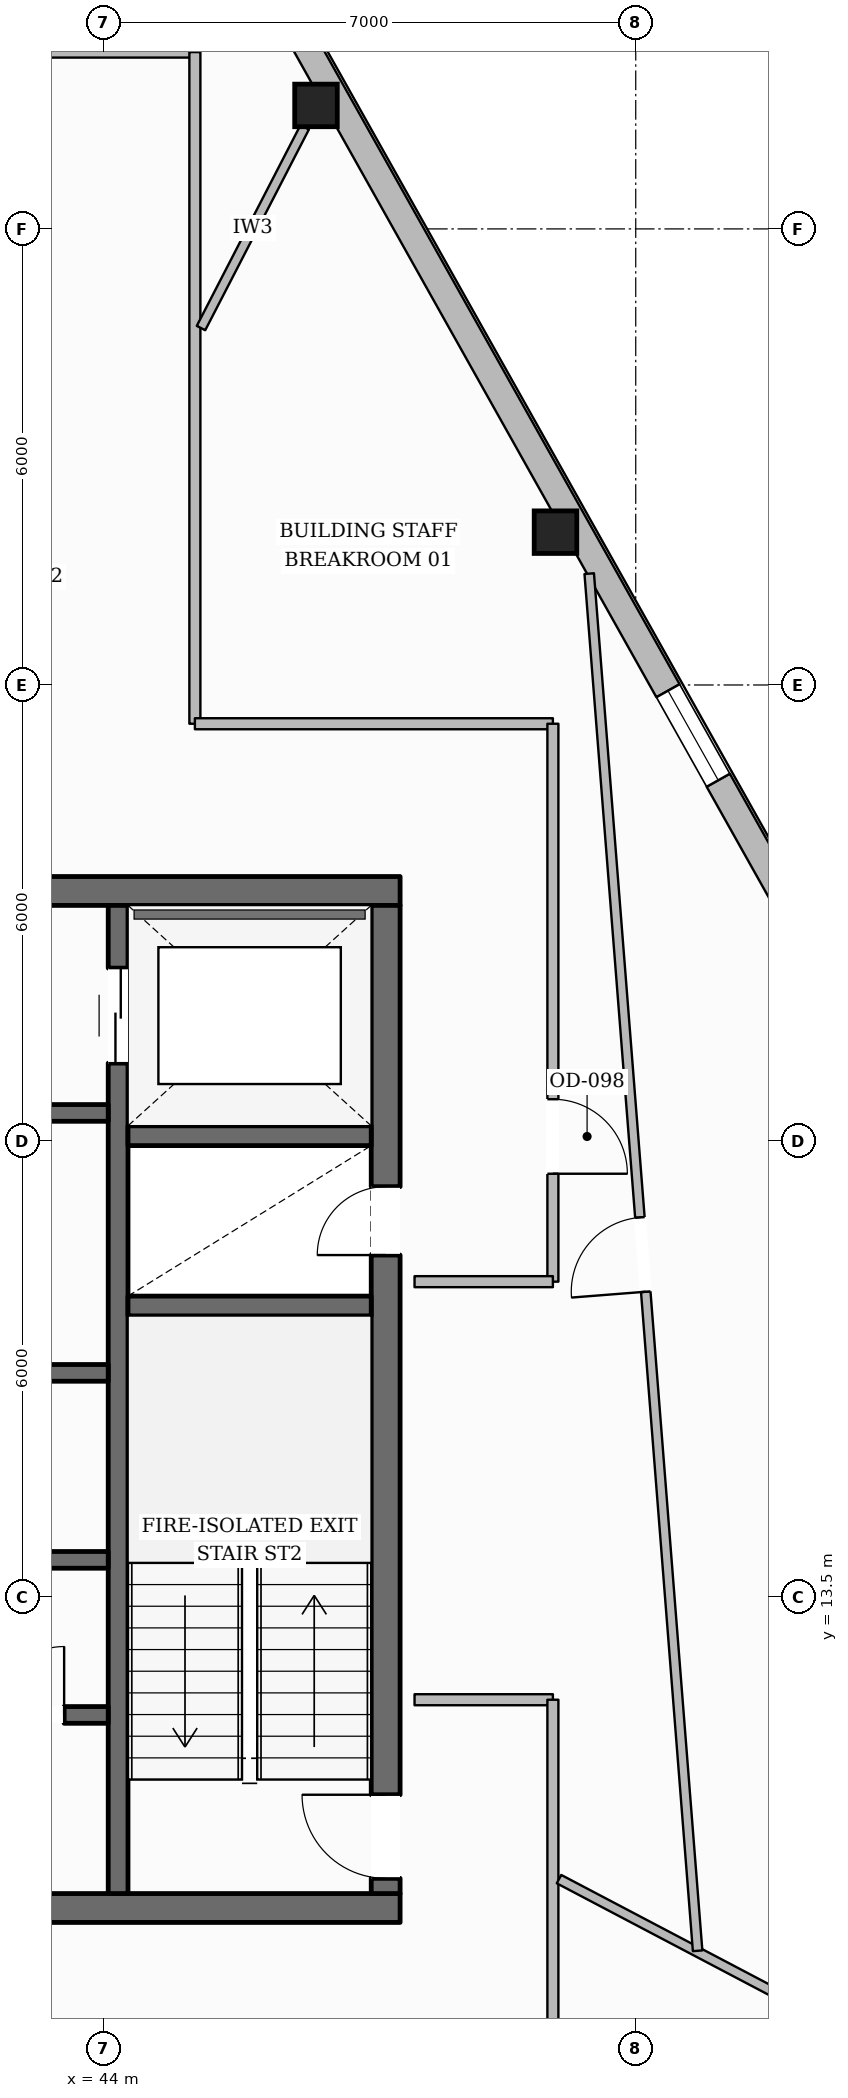
"""IFC4 building model, lengths in metres.
Left out: names, types, materials, properties, quantities, classifications, styles, units other than length and angle.
Written with IfcOpenShell. Run it as: python <this file> out.ifc"""

import sys

from ifc_helpers import new_model, si_unit, direction, frame, frame_2d, origin, origin_2d, place, context, subcontext, project, spatial, rectangle, hollow_rectangle, extrude, element, fill, save


model = new_model("IFC4")
c1 = context("Model", 3, precision=1e-05, world=origin(), true_north=direction((0.0, 1.0)))
c2 = subcontext(c1, "Body", "Model", "MODEL_VIEW")
j1 = project(units=[si_unit("LENGTHUNIT", "METRE"), si_unit("PLANEANGLEUNIT", "RADIAN")], contexts=[c1])
p1 = place(None, origin())
s1 = spatial("IfcSite", under=j1, at=p1, CompositionType="ELEMENT")
p2 = place(p1, origin())
s2 = spatial("IfcBuilding", under=s1, at=p2, CompositionType="ELEMENT")
p3 = place(p2, frame((0.0, 0.0, 301.1)))
s3 = spatial("IfcBuildingStorey", under=s2, at=p3, CompositionType="ELEMENT", Elevation=301.1)
p4 = place(p3, frame((28.1, 9.41, 0.0), z_axis=(0.0, 0.0, 1.0), x_axis=(1.0, 0.0, 0.0)))
e1 = element("IfcWall", 1, at=p4, inside=s3, PredefinedType="SOLIDWALL", context=c2, shape_type="SweptSolid", body=[
    extrude(rectangle(XDim=19.8, YDim=0.38, at=frame_2d((9.9, 0.0))), origin(), (0.0, 0.0, 1.0), 3.635),
])
p5 = place(p4, frame((10.4, 0.0, 0.0)))
e2 = element("IfcOpeningElement", 2, at=p5, cuts=e1, PredefinedType="OPENING", context=c2, shape_type="SweptSolid", body=[
    extrude(rectangle(XDim=1.4, YDim=2.2, at=frame_2d((0.7, 1.1))), frame((0.0, 0.2, 0.0), z_axis=(0.0, -1.0, 0.0), x_axis=(1.0, 0.0, 0.0)), (0.0, 0.0, 1.0), 0.4),
])
p6 = place(p3, frame((28.1, 22.79, 0.0), z_axis=(0.0, 0.0, 1.0), x_axis=(1.0, 0.0, 0.0)))
e3 = element("IfcWall", 3, at=p6, inside=s3, PredefinedType="SOLIDWALL", context=c2, shape_type="SweptSolid", body=[
    extrude(rectangle(XDim=19.8, YDim=0.38, at=frame_2d((9.9, 0.0))), origin(), (0.0, 0.0, 1.0), 3.635),
])
p7 = place(p6, frame((6.175, 0.0, 0.0)))
e4 = element("IfcOpeningElement", 4, at=p7, cuts=e3, PredefinedType="OPENING", context=c2, shape_type="SweptSolid", body=[
    extrude(rectangle(XDim=1.05, YDim=2.15, at=frame_2d((0.525, 1.075))), frame((0.0, 0.2, 0.0), z_axis=(0.0, -1.0, 0.0), x_axis=(1.0, 0.0, 0.0)), (0.0, 0.0, 1.0), 0.4),
])
p8 = place(p6, frame((12.575, 0.0, 0.0)))
e5 = element("IfcOpeningElement", 5, at=p8, cuts=e3, PredefinedType="OPENING", context=c2, shape_type="SweptSolid", body=[
    extrude(rectangle(XDim=1.05, YDim=2.15, at=frame_2d((0.525, 1.075))), frame((0.0, 0.2, 0.0), z_axis=(0.0, -1.0, 0.0), x_axis=(1.0, 0.0, 0.0)), (0.0, 0.0, 1.0), 0.4),
])
p9 = place(p3, frame((47.71, 9.6, 0.0), z_axis=(0.0, 0.0, 1.0), x_axis=(0.0, 1.0, 0.0)))
e6 = element("IfcWall", 6, at=p9, inside=s3, PredefinedType="SOLIDWALL", context=c2, shape_type="SweptSolid", body=[
    extrude(rectangle(XDim=13.0, YDim=0.38, at=frame_2d((6.5, 0.0))), origin(), (0.0, 0.0, 1.0), 3.635),
])
p10 = place(p9, frame((0.2, 0.0, 0.0)))
e7 = element("IfcOpeningElement", 7, at=p10, cuts=e6, PredefinedType="OPENING", context=c2, shape_type="SweptSolid", body=[
    extrude(rectangle(XDim=1.1, YDim=2.15, at=frame_2d((0.55, 1.075))), frame((0.0, 0.2, 0.0), z_axis=(0.0, -1.0, 0.0), x_axis=(1.0, 0.0, 0.0)), (0.0, 0.0, 1.0), 0.4),
])
p11 = place(p9, frame((8.4, 0.0, 0.0)))
e8 = element("IfcOpeningElement", 8, at=p11, cuts=e6, PredefinedType="OPENING", context=c2, shape_type="SweptSolid", body=[
    extrude(rectangle(XDim=0.9, YDim=2.1, at=frame_2d((0.45, 1.05))), frame((0.0, 0.2, 0.0), z_axis=(0.0, -1.0, 0.0), x_axis=(1.0, 0.0, 0.0)), (0.0, 0.0, 1.0), 0.4),
])
p12 = place(p3, frame((44.19, 9.6, 0.0), z_axis=(0.0, 0.0, 1.0), x_axis=(0.0, 1.0, 0.0)))
e9 = element("IfcWall", 9, at=p12, inside=s3, PredefinedType="SHEAR", context=c2, shape_type="SweptSolid", body=[
    extrude(rectangle(XDim=13.0, YDim=0.26, at=frame_2d((6.5, 0.0))), origin(), (0.0, 0.0, 1.0), 3.635),
])
p13 = place(p12, frame((10.925, 0.0, 0.0)))
e10 = element("IfcOpeningElement", 10, at=p13, cuts=e9, PredefinedType="OPENING", context=c2, shape_type="SweptSolid", body=[
    extrude(rectangle(XDim=1.25, YDim=2.25, at=frame_2d((0.625, 1.125))), frame((0.0, 0.14, 0.0), z_axis=(0.0, -1.0, 0.0), x_axis=(1.0, 0.0, 0.0)), (0.0, 0.0, 1.0), 0.28),
])
for number, where, z_axis, x_axis in (
    (11, (44.32, 17.33, 0.0), (0.0, 0.0, 1.0), (1.0, 0.0, 0.0)),
    (12, (44.32, 19.57, 0.0), (0.0, 0.0, 1.0), (1.0, 0.0, 0.0)),
):
    element("IfcWall", number, at=place(p3, frame(where, z_axis=z_axis, x_axis=x_axis)), inside=s3, PredefinedType="SHEAR", context=c2, shape_type="SweptSolid", body=[
        extrude(rectangle(XDim=3.2, YDim=0.26, at=frame_2d((1.6, 0.0))), origin(), (0.0, 0.0, 1.0), 3.635),
    ])
p14 = place(p3, frame((31.94, 19.87, 0.0), z_axis=(0.0, 0.0, 1.0), x_axis=(1.0, 0.0, 0.0)))
e13 = element("IfcWall", 13, at=p14, inside=s3, PredefinedType="SOLIDWALL", context=c2, shape_type="SweptSolid", body=[
    extrude(rectangle(XDim=12.12, YDim=0.22, at=frame_2d((6.06, 0.0))), origin(), (0.0, 0.0, 1.0), 3.635),
])
p15 = place(p14, frame((6.3, 0.0, 0.0)))
e14 = element("IfcOpeningElement", 14, at=p15, cuts=e13, PredefinedType="OPENING", context=c2, shape_type="SweptSolid", body=[
    extrude(rectangle(XDim=1.1, YDim=2.15, at=frame_2d((0.55, 1.075))), frame((0.0, 0.12, 0.0), z_axis=(0.0, -1.0, 0.0), x_axis=(1.0, 0.0, 0.0)), (0.0, 0.0, 1.0), 0.24),
])
p16 = place(p14, frame((8.01, 0.0, 0.0)))
e15 = element("IfcOpeningElement", 15, at=p16, cuts=e13, PredefinedType="OPENING", context=c2, shape_type="SweptSolid", body=[
    extrude(rectangle(XDim=0.9, YDim=2.1, at=frame_2d((0.45, 1.05))), frame((0.0, 0.12, 0.0), z_axis=(0.0, -1.0, 0.0), x_axis=(1.0, 0.0, 0.0)), (0.0, 0.0, 1.0), 0.24),
])
p17 = place(p14, frame((10.21, 0.0, 0.0)))
e16 = element("IfcOpeningElement", 16, at=p17, cuts=e13, PredefinedType="OPENING", context=c2, shape_type="SweptSolid", body=[
    extrude(rectangle(XDim=0.9, YDim=2.1, at=frame_2d((0.45, 1.05))), frame((0.0, 0.12, 0.0), z_axis=(0.0, -1.0, 0.0), x_axis=(1.0, 0.0, 0.0)), (0.0, 0.0, 1.0), 0.24),
])
p18 = place(p3, frame((31.94, 16.45, 0.0), z_axis=(0.0, 0.0, 1.0), x_axis=(1.0, 0.0, 0.0)))
e17 = element("IfcWall", 17, at=p18, inside=s3, PredefinedType="SOLIDWALL", context=c2, shape_type="SweptSolid", body=[
    extrude(rectangle(XDim=12.12, YDim=0.22, at=frame_2d((6.06, 0.0))), origin(), (0.0, 0.0, 1.0), 3.635),
])
p19 = place(p3, frame((31.94, 13.99, 0.0), z_axis=(0.0, 0.0, 1.0), x_axis=(1.0, 0.0, 0.0)))
e18 = element("IfcWall", 18, at=p19, inside=s3, PredefinedType="SOLIDWALL", context=c2, shape_type="SweptSolid", body=[
    extrude(rectangle(XDim=12.12, YDim=0.22, at=frame_2d((6.06, 0.0))), origin(), (0.0, 0.0, 1.0), 3.635),
])
p20 = place(p19, frame((1.11, 0.0, 0.0)))
e19 = element("IfcOpeningElement", 19, at=p20, cuts=e18, PredefinedType="OPENING", context=c2, shape_type="SweptSolid", body=[
    extrude(rectangle(XDim=0.9, YDim=2.1, at=frame_2d((0.45, 1.05))), frame((0.0, 0.12, 0.0), z_axis=(0.0, -1.0, 0.0), x_axis=(1.0, 0.0, 0.0)), (0.0, 0.0, 1.0), 0.24),
])
p21 = place(p19, frame((5.16, 0.0, 0.0)))
e20 = element("IfcOpeningElement", 20, at=p21, cuts=e18, PredefinedType="OPENING", context=c2, shape_type="SweptSolid", body=[
    extrude(rectangle(XDim=0.9, YDim=2.1, at=frame_2d((0.45, 1.05))), frame((0.0, 0.12, 0.0), z_axis=(0.0, -1.0, 0.0), x_axis=(1.0, 0.0, 0.0)), (0.0, 0.0, 1.0), 0.24),
])
p22 = place(p19, frame((9.61, 0.0, 0.0)))
e21 = element("IfcOpeningElement", 21, at=p22, cuts=e18, PredefinedType="OPENING", context=c2, shape_type="SweptSolid", body=[
    extrude(rectangle(XDim=0.9, YDim=2.1, at=frame_2d((0.45, 1.05))), frame((0.0, 0.12, 0.0), z_axis=(0.0, -1.0, 0.0), x_axis=(1.0, 0.0, 0.0)), (0.0, 0.0, 1.0), 0.24),
])
p23 = place(p3, frame((40.28, 11.95, 0.0), z_axis=(0.0, 0.0, 1.0), x_axis=(1.0, 0.0, 0.0)))
e22 = element("IfcWall", 22, at=p23, inside=s3, PredefinedType="SOLIDWALL", context=c2, shape_type="SweptSolid", body=[
    extrude(rectangle(XDim=3.78, YDim=0.22, at=frame_2d((1.89, 0.0))), origin(), (0.0, 0.0, 1.0), 3.635),
])
p24 = place(p23, frame((0.47, 0.0, 0.0)))
e23 = element("IfcOpeningElement", 23, at=p24, cuts=e22, PredefinedType="OPENING", context=c2, shape_type="SweptSolid", body=[
    extrude(rectangle(XDim=0.9, YDim=2.1, at=frame_2d((0.45, 1.05))), frame((0.0, 0.12, 0.0), z_axis=(0.0, -1.0, 0.0), x_axis=(1.0, 0.0, 0.0)), (0.0, 0.0, 1.0), 0.24),
])
p25 = place(p23, frame((2.3, 0.0, 0.0)))
e24 = element("IfcOpeningElement", 24, at=p25, cuts=e22, PredefinedType="OPENING", context=c2, shape_type="SweptSolid", body=[
    extrude(rectangle(XDim=0.9, YDim=2.1, at=frame_2d((0.45, 1.05))), frame((0.0, 0.12, 0.0), z_axis=(0.0, -1.0, 0.0), x_axis=(1.0, 0.0, 0.0)), (0.0, 0.0, 1.0), 0.24),
])
for number, where, z_axis, x_axis in (
    (25, (49.944, 27.51, 0.0), (0.0, 0.0, 1.0), (1.0, 0.0, 0.0)),
    (26, (46.793, 33.125, 0.0), (0.0, 0.0, 1.0), (1.0, 0.0, 0.0)),
):
    element("IfcColumn", number, at=place(p3, frame(where, z_axis=z_axis, x_axis=x_axis)), inside=s3, PredefinedType="COLUMN", context=c2, shape_type="SweptSolid", body=[
        extrude(hollow_rectangle(XDim=0.56, YDim=0.56, WallThickness=0.025, at=origin_2d()), origin(), (0.0, 0.0, 1.0), 3.635),
    ])
p26 = place(p3, frame((40.491, 44.906, 0.0), z_axis=(0.0, 0.0, 1.0), x_axis=(0.489429021632, -0.872043136997, 0.0)))
e27 = element("IfcWall", 27, at=p26, inside=s3, PredefinedType="STANDARD", context=c2, shape_type="SweptSolid", body=[
    extrude(rectangle(XDim=39.581, YDim=0.35, at=frame_2d((19.79, 0.0))), origin(), (0.0, 0.0, 1.0), 3.221),
])
p27 = place(p26, frame((29.085, 0.0, 0.0)))
e28 = element("IfcOpeningElement", 28, at=p27, cuts=e27, PredefinedType="OPENING", context=c2, shape_type="SweptSolid", body=[
    extrude(rectangle(XDim=1.0, YDim=2.2, at=frame_2d((0.5, 1.1))), frame((0.0, 0.185, 0.0), z_axis=(0.0, -1.0, 0.0), x_axis=(1.0, 0.0, 0.0)), (0.0, 0.0, 1.0), 0.37),
])
p28 = place(p26, frame((35.216, 0.0, 0.65)))
e29 = element("IfcOpeningElement", 29, at=p28, cuts=e27, PredefinedType="OPENING", context=c2, shape_type="SweptSolid", body=[
    extrude(rectangle(XDim=1.35, YDim=1.75, at=frame_2d((0.675, 0.875))), frame((0.0, 0.185, 0.0), z_axis=(0.0, -1.0, 0.0), x_axis=(1.0, 0.0, 0.0)), (0.0, 0.0, 1.0), 0.37),
])
p29 = place(p26, frame((22.34, 0.0, 0.65)))
e30 = element("IfcOpeningElement", 30, at=p29, cuts=e27, PredefinedType="OPENING", context=c2, shape_type="SweptSolid", body=[
    extrude(rectangle(XDim=1.35, YDim=1.75, at=frame_2d((0.675, 0.875))), frame((0.0, 0.185, 0.0), z_axis=(0.0, -1.0, 0.0), x_axis=(1.0, 0.0, 0.0)), (0.0, 0.0, 1.0), 0.37),
])
p30 = place(p26, frame((9.464, 0.0, 0.65)))
e31 = element("IfcOpeningElement", 31, at=p30, cuts=e27, PredefinedType="OPENING", context=c2, shape_type="SweptSolid", body=[
    extrude(rectangle(XDim=1.35, YDim=1.75, at=frame_2d((0.675, 0.875))), frame((0.0, 0.185, 0.0), z_axis=(0.0, -1.0, 0.0), x_axis=(1.0, 0.0, 0.0)), (0.0, 0.0, 1.0), 0.37),
])
p31 = place(p26, frame((3.026, 0.0, 0.65)))
e32 = element("IfcOpeningElement", 32, at=p31, cuts=e27, PredefinedType="OPENING", context=c2, shape_type="SweptSolid", body=[
    extrude(rectangle(XDim=1.35, YDim=1.75, at=frame_2d((0.675, 0.875))), frame((0.0, 0.185, 0.0), z_axis=(0.0, -1.0, 0.0), x_axis=(1.0, 0.0, 0.0)), (0.0, 0.0, 1.0), 0.37),
])
p32 = place(p3, frame((43.2, 33.826, 0.0), z_axis=(0.0, 0.0, 1.0), x_axis=(1.0, 0.0, 0.0)))
e33 = element("IfcWall", 33, at=p32, inside=s3, PredefinedType="PARTITIONING", context=c2, shape_type="SweptSolid", body=[
    extrude(rectangle(XDim=2.0, YDim=0.145, at=frame_2d((1.0, 0.0))), origin(), (0.0, 0.0, 1.0), 3.635),
])
p33 = place(p3, frame((45.2, 33.826, 0.0), z_axis=(0.0, 0.0, 1.0), x_axis=(0.0, -1.0, 0.0)))
e34 = element("IfcWall", 34, at=p33, inside=s3, PredefinedType="PARTITIONING", context=c2, shape_type="SweptSolid", body=[
    extrude(rectangle(XDim=8.836, YDim=0.145, at=frame_2d((4.418, 0.0))), origin(), (0.0, 0.0, 1.0), 3.635),
])
p34 = place(p3, frame((45.2, 24.99, 0.0), z_axis=(0.0, 0.0, 1.0), x_axis=(1.0, 0.0, 0.0)))
e35 = element("IfcWall", 35, at=p34, inside=s3, PredefinedType="PARTITIONING", context=c2, shape_type="SweptSolid", body=[
    extrude(rectangle(XDim=4.71, YDim=0.145, at=frame_2d((2.355, 0.0))), origin(), (0.0, 0.0, 1.0), 3.635),
])
p35 = place(p3, frame((49.91, 24.99, 0.0), z_axis=(0.0, 0.0, 1.0), x_axis=(0.0, -1.0, 0.0)))
e36 = element("IfcWall", 36, at=p35, inside=s3, PredefinedType="PARTITIONING", context=c2, shape_type="SweptSolid", body=[
    extrude(rectangle(XDim=7.34, YDim=0.145, at=frame_2d((3.67, 0.0))), origin(), (0.0, 0.0, 1.0), 3.374),
])
p36 = place(p35, frame((4.94, 0.0, 0.0)))
e37 = element("IfcOpeningElement", 37, at=p36, cuts=e36, PredefinedType="OPENING", context=c2, shape_type="SweptSolid", body=[
    extrude(rectangle(XDim=0.98, YDim=2.15, at=frame_2d((0.49, 1.075))), frame((0.0, 0.083, 0.0), z_axis=(0.0, -1.0, 0.0), x_axis=(1.0, 0.0, 0.0)), (0.0, 0.0, 1.0), 0.165),
])
for number, where, z_axis, x_axis in (
    (38, (49.91, 17.65, 0.0), (0.0, 0.0, 1.0), (-1.0, 0.0, 0.0)),
    (39, (48.09, 12.15, 0.0), (0.0, 0.0, 1.0), (1.0, 0.0, 0.0)),
):
    element("IfcWall", number, at=place(p3, frame(where, z_axis=z_axis, x_axis=x_axis)), inside=s3, PredefinedType="PARTITIONING", context=c2, shape_type="SweptSolid", body=[
        extrude(rectangle(XDim=1.82, YDim=0.145, at=frame_2d((0.91, 0.0))), origin(), (0.0, 0.0, 1.0), 3.635),
    ])
p37 = place(p3, frame((49.91, 12.15, 0.0), z_axis=(0.0, 0.0, 1.0), x_axis=(0.0, -1.0, 0.0)))
e40 = element("IfcWall", 40, at=p37, inside=s3, PredefinedType="PARTITIONING", context=c2, shape_type="SweptSolid", body=[
    extrude(rectangle(XDim=4.94, YDim=0.145, at=frame_2d((2.47, 0.0))), origin(), (0.0, 0.0, 1.0), 3.635),
])
p38 = place(p3, frame((45.281, 30.196, 0.0), z_axis=(0.0, 0.0, 1.0), x_axis=(0.458904431831, 0.88848563435, 0.0)))
e41 = element("IfcWall", 41, at=p38, inside=s3, PredefinedType="PARTITIONING", context=c2, shape_type="SweptSolid", body=[
    extrude(rectangle(XDim=2.972, YDim=0.125, at=frame_2d((1.486, 0.0))), origin(), (0.0, 0.0, 1.0), 3.635),
])
p39 = place(p3, frame((49.99, 9.79, 0.0), z_axis=(0.0, 0.0, 1.0), x_axis=(0.884938130068, -0.465708606267, 0.0)))
e42 = element("IfcWall", 42, at=p39, inside=s3, PredefinedType="PARTITIONING", context=c2, shape_type="SweptSolid", body=[
    extrude(rectangle(XDim=7.448, YDim=0.125, at=frame_2d((3.724, 0.0))), origin(), (0.0, 0.0, 1.0), 3.271),
])
p40 = place(p3, frame((51.814, 8.847, 0.0), z_axis=(0.0, 0.0, 1.0), x_axis=(-0.078479740874, 0.99691570871, 0.0)))
e43 = element("IfcWall", 43, at=p40, inside=s3, PredefinedType="PARTITIONING", context=c2, shape_type="SweptSolid", body=[
    extrude(rectangle(XDim=18.174, YDim=0.125, at=frame_2d((9.087, 0.0))), origin(), (0.0, 0.0, 1.0), 3.224),
])
p41 = place(p40, frame((8.698, 0.0, 0.0)))
e44 = element("IfcOpeningElement", 44, at=p41, cuts=e43, PredefinedType="OPENING", context=c2, shape_type="SweptSolid", body=[
    extrude(rectangle(XDim=0.98, YDim=2.15, at=frame_2d((0.49, 1.075))), frame((0.0, 0.073, 0.0), z_axis=(0.0, -1.0, 0.0), x_axis=(1.0, 0.0, 0.0)), (0.0, 0.0, 1.0), 0.145),
])
p42 = place(p3, frame((46.036, 34.719, 0.0), z_axis=(0.0, 0.0, 1.0), x_axis=(-0.996715116999, -0.080987502409, 0.0)))
e45 = element("IfcWall", 45, at=p42, inside=s3, PredefinedType="PARTITIONING", context=c2, shape_type="SweptSolid", body=[
    extrude(rectangle(XDim=16.996, YDim=0.125, at=frame_2d((8.498, 0.0))), origin(), (0.0, 0.0, 1.0), 3.374),
])
p43 = place(p42, frame((8.008, 0.0, 0.0)))
e46 = element("IfcOpeningElement", 46, at=p43, cuts=e45, PredefinedType="OPENING", context=c2, shape_type="SweptSolid", body=[
    extrude(rectangle(XDim=0.98, YDim=2.15, at=frame_2d((0.49, 1.075))), frame((0.0, 0.073, 0.0), z_axis=(0.0, -1.0, 0.0), x_axis=(1.0, 0.0, 0.0)), (0.0, 0.0, 1.0), 0.145),
])
p44 = place(p29, origin())
e47 = element("IfcWindow", 47, at=p44, inside=s3, PartitioningType="SINGLE_PANEL", PredefinedType="WINDOW", context=c2, shape_type="SweptSolid", body=[
    extrude(rectangle(XDim=1.35, YDim=1.75, at=frame_2d((0.675, 0.875))), frame((0.0, 0.03, 0.0), z_axis=(0.0, -1.0, 0.0), x_axis=(1.0, 0.0, 0.0)), (0.0, 0.0, 1.0), 0.06),
])
fill(e30, e47)
p45 = place(p10, origin())
e48 = element("IfcDoor", 48, at=p45, inside=s3, OperationType="SINGLE_SWING_RIGHT", PredefinedType="DOOR", context=c2, shape_type="SweptSolid", body=[
    extrude(rectangle(XDim=1.1, YDim=2.15, at=frame_2d((0.55, 1.075))), frame((0.0, 0.025, 0.0), z_axis=(0.0, -1.0, 0.0), x_axis=(1.0, 0.0, 0.0)), (0.0, 0.0, 1.0), 0.05),
])
fill(e7, e48)
p46 = place(p11, origin())
e49 = element("IfcDoor", 49, at=p46, inside=s3, OperationType="SINGLE_SWING_LEFT", PredefinedType="DOOR", context=c2, shape_type="SweptSolid", body=[
    extrude(rectangle(XDim=0.9, YDim=2.1, at=frame_2d((0.45, 1.05))), frame((0.0, 0.025, 0.0), z_axis=(0.0, -1.0, 0.0), x_axis=(1.0, 0.0, 0.0)), (0.0, 0.0, 1.0), 0.05),
])
fill(e8, e49)
p47 = place(p13, origin())
e50 = element("IfcDoor", 50, at=p47, inside=s3, OperationType="DOUBLE_DOOR_SLIDING", PredefinedType="DOOR", context=c2, shape_type="SweptSolid", body=[
    extrude(rectangle(XDim=1.25, YDim=2.25, at=frame_2d((0.625, 1.125))), frame((0.0, 0.025, 0.0), z_axis=(0.0, -1.0, 0.0), x_axis=(1.0, 0.0, 0.0)), (0.0, 0.0, 1.0), 0.05),
])
fill(e10, e50)
p48 = place(p25, origin())
e51 = element("IfcDoor", 51, at=p48, inside=s3, OperationType="SINGLE_SWING_RIGHT", PredefinedType="DOOR", context=c2, shape_type="SweptSolid", body=[
    extrude(rectangle(XDim=0.9, YDim=2.1, at=frame_2d((0.45, 1.05))), frame((0.0, 0.025, 0.0), z_axis=(0.0, -1.0, 0.0), x_axis=(1.0, 0.0, 0.0)), (0.0, 0.0, 1.0), 0.05),
])
fill(e24, e51)
p49 = place(p36, origin())
e52 = element("IfcDoor", 52, at=p49, inside=s3, OperationType="SINGLE_SWING_RIGHT", PredefinedType="DOOR", context=c2, shape_type="SweptSolid", body=[
    extrude(rectangle(XDim=0.98, YDim=2.15, at=frame_2d((0.49, 1.075))), frame((0.0, 0.025, 0.0), z_axis=(0.0, -1.0, 0.0), x_axis=(1.0, 0.0, 0.0)), (0.0, 0.0, 1.0), 0.05),
])
fill(e37, e52)
p50 = place(p41, origin())
e53 = element("IfcDoor", 53, at=p50, inside=s3, OperationType="SINGLE_SWING_LEFT", PredefinedType="DOOR", context=c2, shape_type="SweptSolid", body=[
    extrude(rectangle(XDim=0.98, YDim=2.15, at=frame_2d((0.49, 1.075))), frame((0.0, 0.025, 0.0), z_axis=(0.0, -1.0, 0.0), x_axis=(1.0, 0.0, 0.0)), (0.0, 0.0, 1.0), 0.05),
])
fill(e44, e53)
save(model, sys.argv[1])
